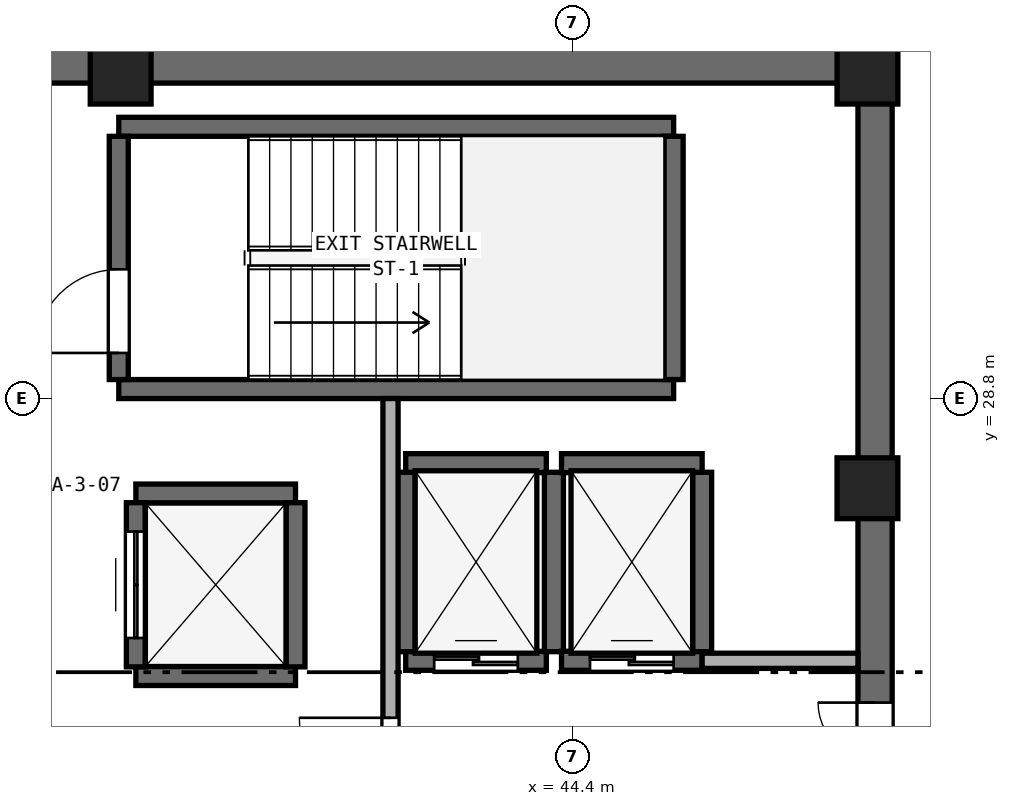
"""IFC4 building model, lengths in metres.
Left out: names, types, materials, properties, quantities, classifications, styles, units other than length and angle.
Written with IfcOpenShell. Run it as: python <this file> out.ifc"""

import sys

from ifc_helpers import new_model, si_unit, direction, frame, frame_2d, origin, origin_2d, place, context, subcontext, project, spatial, rectangle, extrude, element, fill, save


model = new_model("IFC4")
c1 = context("Model", 3, precision=1e-05, world=origin(), true_north=direction((0.0, 1.0)))
c2 = subcontext(c1, "Body", "Model", "MODEL_VIEW")
j1 = project(units=[si_unit("LENGTHUNIT", "METRE"), si_unit("PLANEANGLEUNIT", "RADIAN")], contexts=[c1])
p1 = place(None, origin())
s1 = spatial("IfcSite", under=j1, at=p1, CompositionType="ELEMENT")
p2 = place(p1, origin())
s2 = spatial("IfcBuilding", under=s1, at=p2, CompositionType="ELEMENT")
p3 = place(p2, frame((0.0, 0.0, 285.8)))
s3 = spatial("IfcBuildingStorey", under=s2, at=p3, CompositionType="ELEMENT", Elevation=285.8)
p4 = place(p3, frame((25.4, 33.175, 0.0), z_axis=(0.0, 0.0, 1.0), x_axis=(1.0, 0.0, 0.0)))
e1 = element("IfcWall", 1, at=p4, inside=s3, PredefinedType="SHEAR", context=c2, shape_type="SweptSolid", body=[
    extrude(rectangle(XDim=23.2, YDim=0.45, at=frame_2d((11.6, 0.0))), origin(), (0.0, 0.0, 1.0), 3.54),
])
p5 = place(p3, frame((48.375, 17.45, 0.0), z_axis=(0.0, 0.0, 1.0), x_axis=(0.0, 1.0, 0.0)))
e2 = element("IfcWall", 2, at=p5, inside=s3, PredefinedType="SHEAR", context=c2, shape_type="SweptSolid", body=[
    extrude(rectangle(XDim=15.5, YDim=0.45, at=frame_2d((7.75, 0.0))), origin(), (0.0, 0.0, 1.0), 3.54),
])
p6 = place(p5, frame((5.85, 0.0, 0.0)))
e3 = element("IfcOpeningElement", 3, at=p6, cuts=e2, PredefinedType="OPENING", context=c2, shape_type="SweptSolid", body=[
    extrude(rectangle(XDim=1.5, YDim=2.15, at=frame_2d((0.75, 1.075))), frame((0.0, 0.235, 0.0), z_axis=(0.0, -1.0, 0.0), x_axis=(1.0, 0.0, 0.0)), (0.0, 0.0, 1.0), 0.47),
])
for number, where, z_axis, x_axis in (
    (4, (48.275, 27.62, 0.0), (0.0, 0.0, 1.0), (1.0, 0.0, 0.0)),
    (5, (48.275, 33.075, 0.0), (0.0, 0.0, 1.0), (1.0, 0.0, 0.0)),
    (6, (38.45, 33.075, 0.0), (0.0, 0.0, 1.0), (1.0, 0.0, 0.0)),
):
    element("IfcColumn", number, at=place(p3, frame(where, z_axis=z_axis, x_axis=x_axis)), inside=s3, PredefinedType="PILASTER", context=c2, shape_type="SweptSolid", body=[
        extrude(rectangle(XDim=0.8, YDim=0.8, at=origin_2d()), origin(), (0.0, 0.0, 1.0), 3.8),
    ])
for number, where, z_axis, x_axis in (
    (7, (38.425, 28.925, 0.0), (0.0, 0.0, 1.0), (1.0, 0.0, 0.0)),
    (8, (38.425, 32.375, 0.0), (0.0, 0.0, 1.0), (1.0, 0.0, 0.0)),
):
    element("IfcWall", number, at=place(p3, frame(where, z_axis=z_axis, x_axis=x_axis)), inside=s3, PredefinedType="SHEAR", context=c2, shape_type="SweptSolid", body=[
        extrude(rectangle(XDim=7.3, YDim=0.25, at=frame_2d((3.65, 0.0))), origin(), (0.0, 0.0, 1.0), 3.54),
    ])
p7 = place(p3, frame((38.425, 29.05, 0.0), z_axis=(0.0, 0.0, 1.0), x_axis=(0.0, 1.0, 0.0)))
e9 = element("IfcWall", 9, at=p7, inside=s3, PredefinedType="SHEAR", context=c2, shape_type="SweptSolid", body=[
    extrude(rectangle(XDim=3.2, YDim=0.25, at=frame_2d((1.6, 0.0))), origin(), (0.0, 0.0, 1.0), 3.54),
])
p8 = place(p7, frame((0.35, 0.0, 0.0)))
e10 = element("IfcOpeningElement", 10, at=p8, cuts=e9, PredefinedType="OPENING", context=c2, shape_type="SweptSolid", body=[
    extrude(rectangle(XDim=1.1, YDim=2.15, at=frame_2d((0.55, 1.075))), frame((0.0, 0.135, 0.0), z_axis=(0.0, -1.0, 0.0), x_axis=(1.0, 0.0, 0.0)), (0.0, 0.0, 1.0), 0.27),
])
p9 = place(p3, frame((45.725, 29.05, 0.0), z_axis=(0.0, 0.0, 1.0), x_axis=(0.0, 1.0, 0.0)))
e11 = element("IfcWall", 11, at=p9, inside=s3, PredefinedType="SHEAR", context=c2, shape_type="SweptSolid", body=[
    extrude(rectangle(XDim=3.2, YDim=0.25, at=frame_2d((1.6, 0.0))), origin(), (0.0, 0.0, 1.0), 3.54),
])
p10 = place(p3, frame((42.2, 25.35, 0.0), z_axis=(0.0, 0.0, 1.0), x_axis=(1.0, 0.0, 0.0)))
e12 = element("IfcWall", 12, at=p10, inside=s3, PredefinedType="SHEAR", context=c2, shape_type="SweptSolid", body=[
    extrude(rectangle(XDim=1.85, YDim=0.25, at=frame_2d((0.925, 0.0))), origin(), (0.0, 0.0, 1.0), 3.54),
])
p11 = place(p10, frame((0.375, 0.0, 0.0)))
e13 = element("IfcOpeningElement", 13, at=p11, cuts=e12, PredefinedType="OPENING", context=c2, shape_type="SweptSolid", body=[
    extrude(rectangle(XDim=1.1, YDim=2.15, at=frame_2d((0.55, 1.075))), frame((0.0, 0.135, 0.0), z_axis=(0.0, -1.0, 0.0), x_axis=(1.0, 0.0, 0.0)), (0.0, 0.0, 1.0), 0.27),
])
p12 = place(p3, frame((42.2, 27.95, 0.0), z_axis=(0.0, 0.0, 1.0), x_axis=(1.0, 0.0, 0.0)))
e14 = element("IfcWall", 14, at=p12, inside=s3, PredefinedType="SHEAR", context=c2, shape_type="SweptSolid", body=[
    extrude(rectangle(XDim=1.85, YDim=0.25, at=frame_2d((0.925, 0.0))), origin(), (0.0, 0.0, 1.0), 3.54),
])
for number, where, z_axis, x_axis in (
    (15, (42.2, 25.47, 0.0), (0.0, 0.0, 1.0), (0.0, 1.0, 0.0)),
    (16, (44.15, 25.47, 0.0), (0.0, 0.0, 1.0), (0.0, 1.0, 0.0)),
):
    element("IfcWall", number, at=place(p3, frame(where, z_axis=z_axis, x_axis=x_axis)), inside=s3, PredefinedType="SHEAR", context=c2, shape_type="SweptSolid", body=[
        extrude(rectangle(XDim=2.36, YDim=0.25, at=frame_2d((1.18, 0.0))), origin(), (0.0, 0.0, 1.0), 3.54),
    ])
p13 = place(p3, frame((44.25, 25.35, 0.0), z_axis=(0.0, 0.0, 1.0), x_axis=(1.0, 0.0, 0.0)))
e17 = element("IfcWall", 17, at=p13, inside=s3, PredefinedType="SHEAR", context=c2, shape_type="SweptSolid", body=[
    extrude(rectangle(XDim=1.85, YDim=0.25, at=frame_2d((0.925, 0.0))), origin(), (0.0, 0.0, 1.0), 3.54),
])
p14 = place(p13, frame((0.375, 0.0, 0.0)))
e18 = element("IfcOpeningElement", 18, at=p14, cuts=e17, PredefinedType="OPENING", context=c2, shape_type="SweptSolid", body=[
    extrude(rectangle(XDim=1.1, YDim=2.15, at=frame_2d((0.55, 1.075))), frame((0.0, 0.135, 0.0), z_axis=(0.0, -1.0, 0.0), x_axis=(1.0, 0.0, 0.0)), (0.0, 0.0, 1.0), 0.27),
])
p15 = place(p3, frame((44.25, 27.95, 0.0), z_axis=(0.0, 0.0, 1.0), x_axis=(1.0, 0.0, 0.0)))
e19 = element("IfcWall", 19, at=p15, inside=s3, PredefinedType="SHEAR", context=c2, shape_type="SweptSolid", body=[
    extrude(rectangle(XDim=1.85, YDim=0.25, at=frame_2d((0.925, 0.0))), origin(), (0.0, 0.0, 1.0), 3.54),
])
p16 = place(p3, frame((46.1, 25.47, 0.0), z_axis=(0.0, 0.0, 1.0), x_axis=(0.0, 1.0, 0.0)))
e20 = element("IfcWall", 20, at=p16, inside=s3, PredefinedType="SHEAR", context=c2, shape_type="SweptSolid", body=[
    extrude(rectangle(XDim=2.36, YDim=0.25, at=frame_2d((1.18, 0.0))), origin(), (0.0, 0.0, 1.0), 3.54),
])
for number, where, z_axis, x_axis in (
    (21, (38.65, 25.15, 0.0), (0.0, 0.0, 1.0), (1.0, 0.0, 0.0)),
    (22, (38.65, 27.55, 0.0), (0.0, 0.0, 1.0), (1.0, 0.0, 0.0)),
):
    element("IfcWall", number, at=place(p3, frame(where, z_axis=z_axis, x_axis=x_axis)), inside=s3, PredefinedType="SHEAR", context=c2, shape_type="SweptSolid", body=[
        extrude(rectangle(XDim=2.1, YDim=0.25, at=frame_2d((1.05, 0.0))), origin(), (0.0, 0.0, 1.0), 3.54),
    ])
p17 = place(p3, frame((38.65, 25.27, 0.0), z_axis=(0.0, 0.0, 1.0), x_axis=(0.0, 1.0, 0.0)))
e23 = element("IfcWall", 23, at=p17, inside=s3, PredefinedType="SHEAR", context=c2, shape_type="SweptSolid", body=[
    extrude(rectangle(XDim=2.16, YDim=0.25, at=frame_2d((1.08, 0.0))), origin(), (0.0, 0.0, 1.0), 3.54),
])
p18 = place(p17, frame((0.38, 0.0, 0.0)))
e24 = element("IfcOpeningElement", 24, at=p18, cuts=e23, PredefinedType="OPENING", context=c2, shape_type="SweptSolid", body=[
    extrude(rectangle(XDim=1.4, YDim=2.2, at=frame_2d((0.7, 1.1))), frame((0.0, 0.135, 0.0), z_axis=(0.0, -1.0, 0.0), x_axis=(1.0, 0.0, 0.0)), (0.0, 0.0, 1.0), 0.27),
])
p19 = place(p3, frame((40.75, 25.27, 0.0), z_axis=(0.0, 0.0, 1.0), x_axis=(0.0, 1.0, 0.0)))
e25 = element("IfcWall", 25, at=p19, inside=s3, PredefinedType="SHEAR", context=c2, shape_type="SweptSolid", body=[
    extrude(rectangle(XDim=2.16, YDim=0.25, at=frame_2d((1.08, 0.0))), origin(), (0.0, 0.0, 1.0), 3.54),
])
p20 = place(p3, frame((42.0, 22.75, 0.0), z_axis=(0.0, 0.0, 1.0), x_axis=(0.0, 1.0, 0.0)))
e26 = element("IfcWall", 26, at=p20, inside=s3, PredefinedType="SOLIDWALL", context=c2, shape_type="SweptSolid", body=[
    extrude(rectangle(XDim=6.05, YDim=0.2, at=frame_2d((3.025, 0.0))), origin(), (0.0, 0.0, 1.0), 3.54),
])
p21 = place(p20, frame((0.65, 0.0, 0.0)))
e27 = element("IfcOpeningElement", 27, at=p21, cuts=e26, PredefinedType="OPENING", context=c2, shape_type="SweptSolid", body=[
    extrude(rectangle(XDim=1.2, YDim=2.15, at=frame_2d((0.6, 1.075))), frame((0.0, 0.11, 0.0), z_axis=(0.0, -1.0, 0.0), x_axis=(1.0, 0.0, 0.0)), (0.0, 0.0, 1.0), 0.22),
])
p22 = place(p3, frame((46.1, 25.35, 0.0), z_axis=(0.0, 0.0, 1.0), x_axis=(1.0, 0.0, 0.0)))
e28 = element("IfcWall", 28, at=p22, inside=s3, PredefinedType="SOLIDWALL", context=c2, shape_type="SweptSolid", body=[
    extrude(rectangle(XDim=2.05, YDim=0.2, at=frame_2d((1.025, 0.0))), origin(), (0.0, 0.0, 1.0), 3.54),
])
p23 = place(p8, origin())
e29 = element("IfcDoor", 29, at=p23, inside=s3, OperationType="SINGLE_SWING_LEFT", PredefinedType="DOOR", context=c2, shape_type="SweptSolid", body=[
    extrude(rectangle(XDim=1.1, YDim=2.15, at=frame_2d((0.55, 1.075))), frame((0.0, 0.025, 0.0), z_axis=(0.0, -1.0, 0.0), x_axis=(1.0, 0.0, 0.0)), (0.0, 0.0, 1.0), 0.05),
])
fill(e10, e29)
p24 = place(p11, origin())
e30 = element("IfcDoor", 30, at=p24, inside=s3, OperationType="DOUBLE_DOOR_SLIDING", PredefinedType="DOOR", context=c2, shape_type="SweptSolid", body=[
    extrude(rectangle(XDim=1.1, YDim=2.15, at=frame_2d((0.55, 1.075))), frame((0.0, 0.025, 0.0), z_axis=(0.0, -1.0, 0.0), x_axis=(1.0, 0.0, 0.0)), (0.0, 0.0, 1.0), 0.05),
])
fill(e13, e30)
p25 = place(p14, origin())
e31 = element("IfcDoor", 31, at=p25, inside=s3, OperationType="DOUBLE_DOOR_SLIDING", PredefinedType="DOOR", context=c2, shape_type="SweptSolid", body=[
    extrude(rectangle(XDim=1.1, YDim=2.15, at=frame_2d((0.55, 1.075))), frame((0.0, 0.025, 0.0), z_axis=(0.0, -1.0, 0.0), x_axis=(1.0, 0.0, 0.0)), (0.0, 0.0, 1.0), 0.05),
])
fill(e18, e31)
p26 = place(p18, origin())
e32 = element("IfcDoor", 32, at=p26, inside=s3, OperationType="DOUBLE_DOOR_SLIDING", PredefinedType="DOOR", context=c2, shape_type="SweptSolid", body=[
    extrude(rectangle(XDim=1.4, YDim=2.2, at=frame_2d((0.7, 1.1))), frame((0.0, 0.025, 0.0), z_axis=(0.0, -1.0, 0.0), x_axis=(1.0, 0.0, 0.0)), (0.0, 0.0, 1.0), 0.05),
])
fill(e24, e32)
p27 = place(p21, origin())
e33 = element("IfcDoor", 33, at=p27, inside=s3, OperationType="SINGLE_SWING_RIGHT", PredefinedType="DOOR", context=c2, shape_type="SweptSolid", body=[
    extrude(rectangle(XDim=1.2, YDim=2.15, at=frame_2d((0.6, 1.075))), frame((0.0, 0.025, 0.0), z_axis=(0.0, -1.0, 0.0), x_axis=(1.0, 0.0, 0.0)), (0.0, 0.0, 1.0), 0.05),
])
fill(e27, e33)
p28 = place(p6, origin())
e34 = element("IfcDoor", 34, at=p28, inside=s3, OperationType="DOUBLE_DOOR_SINGLE_SWING", PredefinedType="DOOR", context=c2, shape_type="SweptSolid", body=[
    extrude(rectangle(XDim=1.5, YDim=2.15, at=frame_2d((0.75, 1.075))), frame((0.0, 0.025, 0.0), z_axis=(0.0, -1.0, 0.0), x_axis=(1.0, 0.0, 0.0)), (0.0, 0.0, 1.0), 0.05),
])
fill(e3, e34)
save(model, sys.argv[1])
